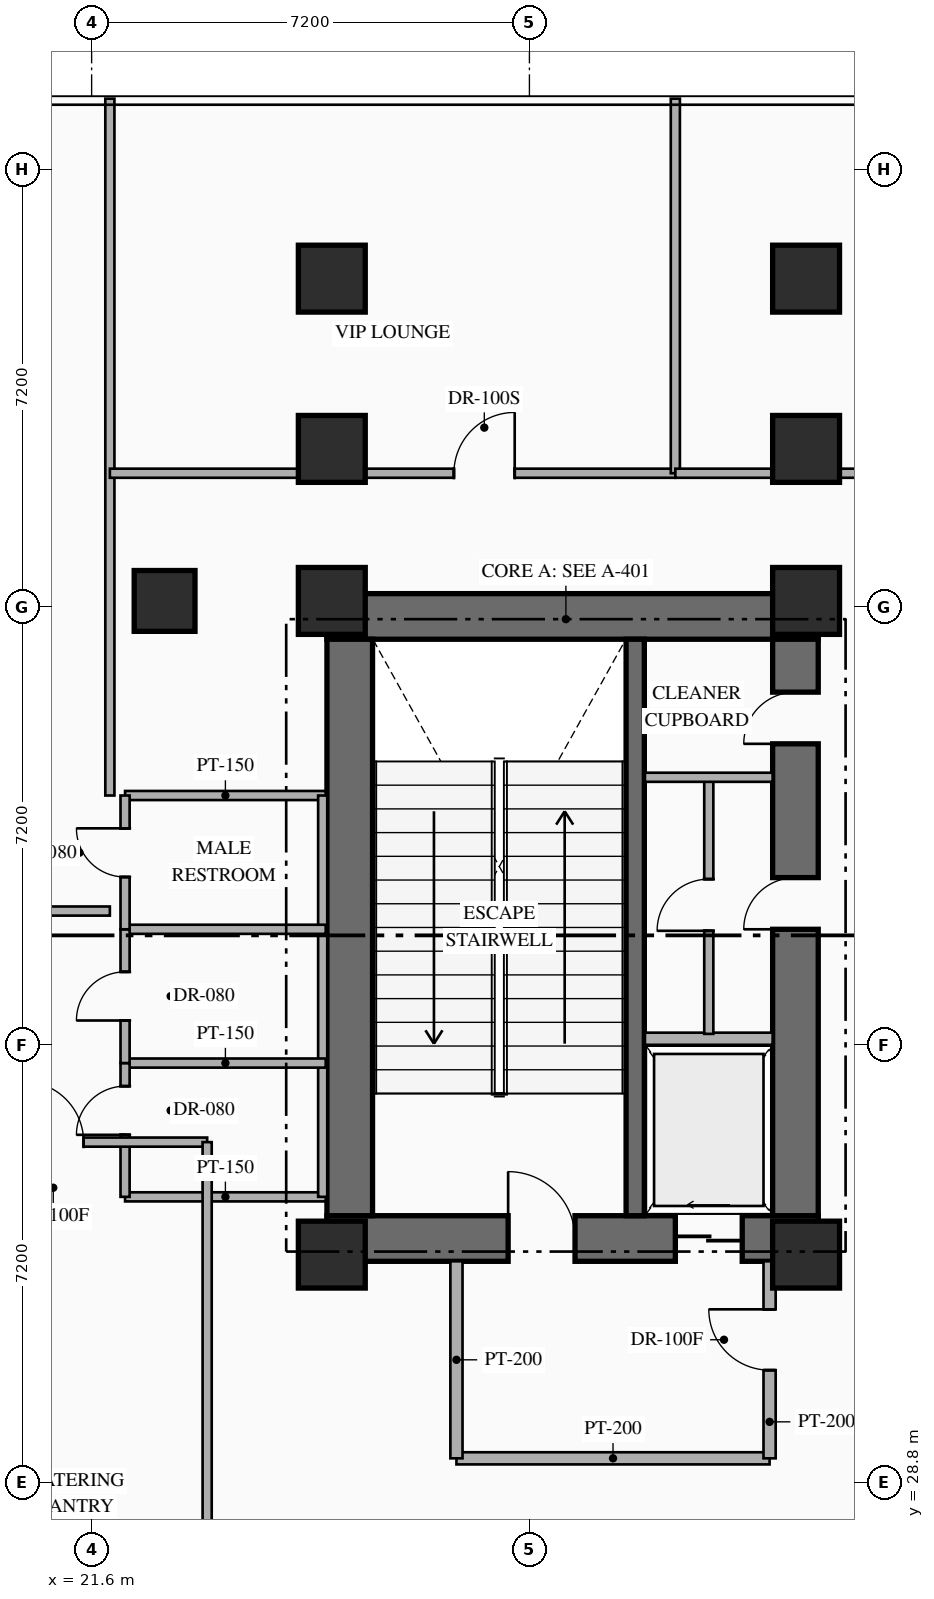
"""IFC4 building model, lengths in metres.
Left out: names, types, materials, properties, quantities, classifications, styles, units other than length and angle.
Written with IfcOpenShell. Run it as: python <this file> out.ifc"""

import sys

from ifc_helpers import new_model, si_unit, direction, frame, frame_2d, origin, origin_2d, place, context, subcontext, project, spatial, rectangle, hollow_rectangle, extrude, element, fill, save


model = new_model("IFC4")
c1 = context("Model", 3, precision=1e-05, world=origin(), true_north=direction((0.0, 1.0)))
c2 = subcontext(c1, "Body", "Model", "MODEL_VIEW")
j1 = project(units=[si_unit("LENGTHUNIT", "METRE"), si_unit("PLANEANGLEUNIT", "RADIAN")], contexts=[c1])
p1 = place(None, origin())
s1 = spatial("IfcSite", under=j1, at=p1, CompositionType="ELEMENT")
p2 = place(p1, origin())
s2 = spatial("IfcBuilding", under=s1, at=p2, CompositionType="ELEMENT")
p3 = place(p2, frame((0.0, 0.0, 16.2)))
s3 = spatial("IfcBuildingStorey", under=s2, at=p3, CompositionType="ELEMENT", Elevation=16.2)
p4 = place(p3, frame((25.47, 32.815, 0.0), z_axis=(0.0, 0.0, 1.0), x_axis=(1.0, 0.0, 0.0)))
e1 = element("IfcWall", 1, at=p4, inside=s3, PredefinedType="SHEAR", context=c2, shape_type="SweptSolid", body=[
    extrude(rectangle(XDim=8.08, YDim=0.75, at=frame_2d((4.04, 0.0))), origin(), (0.0, 0.0, 1.0), 5.4),
])
p5 = place(p4, frame((2.98, 0.0, 0.0)))
e2 = element("IfcOpeningElement", 2, at=p5, cuts=e1, PredefinedType="OPENING", context=c2, shape_type="SweptSolid", body=[
    extrude(rectangle(XDim=1.1, YDim=2.2, at=frame_2d((0.55, 1.1))), frame((0.0, 0.385, 0.0), z_axis=(0.0, -1.0, 0.0), x_axis=(1.0, 0.0, 0.0)), (0.0, 0.0, 1.0), 0.77),
])
p6 = place(p4, frame((5.73, 0.0, 0.0)))
e3 = element("IfcOpeningElement", 3, at=p6, cuts=e1, PredefinedType="OPENING", context=c2, shape_type="SweptSolid", body=[
    extrude(rectangle(XDim=1.1, YDim=2.15, at=frame_2d((0.55, 1.075))), frame((0.0, 0.385, 0.0), z_axis=(0.0, -1.0, 0.0), x_axis=(1.0, 0.0, 0.0)), (0.0, 0.0, 1.0), 0.77),
])
p7 = place(p3, frame((25.47, 43.045, 0.0), z_axis=(0.0, 0.0, 1.0), x_axis=(1.0, 0.0, 0.0)))
e4 = element("IfcWall", 4, at=p7, inside=s3, PredefinedType="SHEAR", context=c2, shape_type="SweptSolid", body=[
    extrude(rectangle(XDim=8.08, YDim=0.75, at=frame_2d((4.04, 0.0))), origin(), (0.0, 0.0, 1.0), 5.4),
])
p8 = place(p3, frame((25.845, 33.19, 0.0), z_axis=(0.0, 0.0, 1.0), x_axis=(0.0, 1.0, 0.0)))
e5 = element("IfcWall", 5, at=p8, inside=s3, PredefinedType="SHEAR", context=c2, shape_type="SweptSolid", body=[
    extrude(rectangle(XDim=9.48, YDim=0.75, at=frame_2d((4.74, 0.0))), origin(), (0.0, 0.0, 1.0), 5.4),
])
p9 = place(p3, frame((33.175, 33.19, 0.0), z_axis=(0.0, 0.0, 1.0), x_axis=(0.0, 1.0, 0.0)))
e6 = element("IfcWall", 6, at=p9, inside=s3, PredefinedType="SHEAR", context=c2, shape_type="SweptSolid", body=[
    extrude(rectangle(XDim=9.48, YDim=0.75, at=frame_2d((4.74, 0.0))), origin(), (0.0, 0.0, 1.0), 5.4),
])
p10 = place(p9, frame((4.71, 0.0, 0.0)))
e7 = element("IfcOpeningElement", 7, at=p10, cuts=e6, PredefinedType="OPENING", context=c2, shape_type="SweptSolid", body=[
    extrude(rectangle(XDim=0.85, YDim=2.08, at=frame_2d((0.425, 1.04))), frame((0.0, 0.385, 0.0), z_axis=(0.0, -1.0, 0.0), x_axis=(1.0, 0.0, 0.0)), (0.0, 0.0, 1.0), 0.77),
])
p11 = place(p9, frame((7.76, 0.0, 0.0)))
e8 = element("IfcOpeningElement", 8, at=p11, cuts=e6, PredefinedType="OPENING", context=c2, shape_type="SweptSolid", body=[
    extrude(rectangle(XDim=0.85, YDim=2.08, at=frame_2d((0.425, 1.04))), frame((0.0, 0.385, 0.0), z_axis=(0.0, -1.0, 0.0), x_axis=(1.0, 0.0, 0.0)), (0.0, 0.0, 1.0), 0.77),
])
p12 = place(p3, frame((30.54, 33.19, 0.0), z_axis=(0.0, 0.0, 1.0), x_axis=(0.0, 1.0, 0.0)))
e9 = element("IfcWall", 9, at=p12, inside=s3, PredefinedType="SHEAR", context=c2, shape_type="SweptSolid", body=[
    extrude(rectangle(XDim=9.48, YDim=0.3, at=frame_2d((4.74, 0.0))), origin(), (0.0, 0.0, 1.0), 5.4),
])
for number, where, z_axis, x_axis in (
    (10, (25.55, 32.55, 0.0), (0.0, 0.0, 1.0), (1.0, 0.0, 0.0)),
    (11, (33.35, 32.55, 0.0), (0.0, 0.0, 1.0), (1.0, 0.0, 0.0)),
    (12, (25.55, 43.3, 0.0), (0.0, 0.0, 1.0), (1.0, 0.0, 0.0)),
    (13, (33.35, 43.3, 0.0), (0.0, 0.0, 1.0), (1.0, 0.0, 0.0)),
):
    element("IfcColumn", number, at=place(p3, frame(where, z_axis=z_axis, x_axis=x_axis)), inside=s3, PredefinedType="COLUMN", context=c2, shape_type="SweptSolid", body=[
        extrude(rectangle(XDim=1.1, YDim=1.1, at=origin_2d()), origin(), (0.0, 0.0, 1.0), 5.4),
    ])
for number, where, z_axis, x_axis in (
    (14, (25.55, 45.8, 0.0), (0.0, 0.0, 1.0), (1.0, 0.0, 0.0)),
    (15, (33.35, 45.8, 0.0), (0.0, 0.0, 1.0), (1.0, 0.0, 0.0)),
    (16, (25.55, 48.6, 0.0), (0.0, 0.0, 1.0), (1.0, 0.0, 0.0)),
    (17, (33.35, 48.6, 0.0), (0.0, 0.0, 1.0), (1.0, 0.0, 0.0)),
):
    element("IfcColumn", number, at=place(p3, frame(where, z_axis=z_axis, x_axis=x_axis)), inside=s3, PredefinedType="COLUMN", context=c2, shape_type="SweptSolid", body=[
        extrude(hollow_rectangle(XDim=1.1, YDim=1.1, WallThickness=0.04, at=origin_2d()), origin(), (0.0, 0.0, 1.0), 5.4),
    ])
p13 = place(p3, frame((22.8, 43.3, 0.0), z_axis=(0.0, 0.0, 1.0), x_axis=(1.0, 0.0, 0.0)))
e18 = element("IfcColumn", 18, at=p13, inside=s3, PredefinedType="COLUMN", context=c2, shape_type="SweptSolid", body=[
    extrude(hollow_rectangle(XDim=1.0, YDim=1.0, WallThickness=0.038, at=origin_2d()), origin(), (0.0, 0.0, 1.0), 5.4),
])
p14 = place(p3, frame((30.7, 36.1, 0.0), z_axis=(0.0, 0.0, 1.0), x_axis=(1.0, 0.0, 0.0)))
e19 = element("IfcWall", 19, at=p14, inside=s3, PredefinedType="STANDARD", context=c2, shape_type="SweptSolid", body=[
    extrude(rectangle(XDim=2.1, YDim=0.2, at=frame_2d((1.05, 0.0))), origin(), (0.0, 0.0, 1.0), 5.1),
])
p15 = place(p3, frame((31.75, 36.18, 0.0), z_axis=(0.0, 0.0, 1.0), x_axis=(0.0, 1.0, 0.0)))
e20 = element("IfcWall", 20, at=p15, inside=s3, PredefinedType="PARTITIONING", context=c2, shape_type="SweptSolid", body=[
    extrude(rectangle(XDim=4.24, YDim=0.15, at=frame_2d((2.12, 0.0))), origin(), (0.0, 0.0, 1.0), 5.1),
])
p16 = place(p15, frame((1.695, 0.0, 0.0)))
e21 = element("IfcOpeningElement", 21, at=p16, cuts=e20, PredefinedType="OPENING", context=c2, shape_type="SweptSolid", body=[
    extrude(rectangle(XDim=0.85, YDim=2.08, at=frame_2d((0.425, 1.04))), frame((0.0, 0.085, 0.0), z_axis=(0.0, -1.0, 0.0), x_axis=(1.0, 0.0, 0.0)), (0.0, 0.0, 1.0), 0.17),
])
p17 = place(p3, frame((30.7, 40.4, 0.0), z_axis=(0.0, 0.0, 1.0), x_axis=(1.0, 0.0, 0.0)))
e22 = element("IfcWall", 22, at=p17, inside=s3, PredefinedType="PARTITIONING", context=c2, shape_type="SweptSolid", body=[
    extrude(rectangle(XDim=2.1, YDim=0.15, at=frame_2d((1.05, 0.0))), origin(), (0.0, 0.0, 1.0), 5.1),
])
p18 = place(p3, frame((27.6, 29.2, 0.0), z_axis=(0.0, 0.0, 1.0), x_axis=(1.0, 0.0, 0.0)))
e23 = element("IfcWall", 23, at=p18, inside=s3, PredefinedType="STANDARD", context=c2, shape_type="SweptSolid", body=[
    extrude(rectangle(XDim=5.15, YDim=0.2, at=frame_2d((2.575, 0.0))), origin(), (0.0, 0.0, 1.0), 5.1),
])
p19 = place(p3, frame((27.6, 29.2, 0.0), z_axis=(0.0, 0.0, 1.0), x_axis=(0.0, 1.0, 0.0)))
e24 = element("IfcWall", 24, at=p19, inside=s3, PredefinedType="STANDARD", context=c2, shape_type="SweptSolid", body=[
    extrude(rectangle(XDim=3.24, YDim=0.2, at=frame_2d((1.62, 0.0))), origin(), (0.0, 0.0, 1.0), 5.1),
])
p20 = place(p3, frame((32.75, 29.2, 0.0), z_axis=(0.0, 0.0, 1.0), x_axis=(0.0, 1.0, 0.0)))
e25 = element("IfcWall", 25, at=p20, inside=s3, PredefinedType="STANDARD", context=c2, shape_type="SweptSolid", body=[
    extrude(rectangle(XDim=3.24, YDim=0.2, at=frame_2d((1.62, 0.0))), origin(), (0.0, 0.0, 1.0), 5.1),
])
p21 = place(p20, frame((1.45, 0.0, 0.0)))
e26 = element("IfcOpeningElement", 26, at=p21, cuts=e25, PredefinedType="OPENING", context=c2, shape_type="SweptSolid", body=[
    extrude(rectangle(XDim=1.0, YDim=2.2, at=frame_2d((0.5, 1.1))), frame((0.0, 0.11, 0.0), z_axis=(0.0, -1.0, 0.0), x_axis=(1.0, 0.0, 0.0)), (0.0, 0.0, 1.0), 0.22),
])
for number, where, z_axis, x_axis in (
    (27, (22.15, 33.5, 0.0), (0.0, 0.0, 1.0), (1.0, 0.0, 0.0)),
    (28, (22.15, 40.1, 0.0), (0.0, 0.0, 1.0), (1.0, 0.0, 0.0)),
):
    element("IfcWall", number, at=place(p3, frame(where, z_axis=z_axis, x_axis=x_axis)), inside=s3, PredefinedType="PARTITIONING", context=c2, shape_type="SweptSolid", body=[
        extrude(rectangle(XDim=3.3, YDim=0.15, at=frame_2d((1.65, 0.0))), origin(), (0.0, 0.0, 1.0), 5.1),
    ])
p22 = place(p3, frame((25.4, 33.5, 0.0), z_axis=(0.0, 0.0, 1.0), x_axis=(0.0, 1.0, 0.0)))
e29 = element("IfcWall", 29, at=p22, inside=s3, PredefinedType="PARTITIONING", context=c2, shape_type="SweptSolid", body=[
    extrude(rectangle(XDim=6.6, YDim=0.15, at=frame_2d((3.3, 0.0))), origin(), (0.0, 0.0, 1.0), 5.1),
])
for number, where, z_axis, x_axis in (
    (30, (22.15, 35.7, 0.0), (0.0, 0.0, 1.0), (1.0, 0.0, 0.0)),
    (31, (22.15, 37.9, 0.0), (0.0, 0.0, 1.0), (1.0, 0.0, 0.0)),
):
    element("IfcWall", number, at=place(p3, frame(where, z_axis=z_axis, x_axis=x_axis)), inside=s3, PredefinedType="PARTITIONING", context=c2, shape_type="SweptSolid", body=[
        extrude(rectangle(XDim=3.3, YDim=0.15, at=frame_2d((1.65, 0.0))), origin(), (0.0, 0.0, 1.0), 5.1),
    ])
p23 = place(p3, frame((22.15, 33.5, 0.0), z_axis=(0.0, 0.0, 1.0), x_axis=(0.0, 1.0, 0.0)))
e32 = element("IfcWall", 32, at=p23, inside=s3, PredefinedType="PARTITIONING", context=c2, shape_type="SweptSolid", body=[
    extrude(rectangle(XDim=2.2, YDim=0.15, at=frame_2d((1.1, 0.0))), origin(), (0.0, 0.0, 1.0), 5.1),
])
p24 = place(p23, frame((1.02, 0.0, 0.0)))
e33 = element("IfcOpeningElement", 33, at=p24, cuts=e32, PredefinedType="OPENING", context=c2, shape_type="SweptSolid", body=[
    extrude(rectangle(XDim=0.8, YDim=2.06, at=frame_2d((0.4, 1.03))), frame((0.0, 0.085, 0.0), z_axis=(0.0, -1.0, 0.0), x_axis=(1.0, 0.0, 0.0)), (0.0, 0.0, 1.0), 0.17),
])
p25 = place(p3, frame((22.15, 35.7, 0.0), z_axis=(0.0, 0.0, 1.0), x_axis=(0.0, 1.0, 0.0)))
e34 = element("IfcWall", 34, at=p25, inside=s3, PredefinedType="PARTITIONING", context=c2, shape_type="SweptSolid", body=[
    extrude(rectangle(XDim=2.2, YDim=0.15, at=frame_2d((1.1, 0.0))), origin(), (0.0, 0.0, 1.0), 5.1),
])
p26 = place(p25, frame((0.7, 0.0, 0.0)))
e35 = element("IfcOpeningElement", 35, at=p26, cuts=e34, PredefinedType="OPENING", context=c2, shape_type="SweptSolid", body=[
    extrude(rectangle(XDim=0.8, YDim=2.06, at=frame_2d((0.4, 1.03))), frame((0.0, 0.085, 0.0), z_axis=(0.0, -1.0, 0.0), x_axis=(1.0, 0.0, 0.0)), (0.0, 0.0, 1.0), 0.17),
])
p27 = place(p3, frame((22.15, 37.9, 0.0), z_axis=(0.0, 0.0, 1.0), x_axis=(0.0, 1.0, 0.0)))
e36 = element("IfcWall", 36, at=p27, inside=s3, PredefinedType="PARTITIONING", context=c2, shape_type="SweptSolid", body=[
    extrude(rectangle(XDim=2.2, YDim=0.15, at=frame_2d((1.1, 0.0))), origin(), (0.0, 0.0, 1.0), 5.1),
])
p28 = place(p27, frame((0.86, 0.0, 0.0)))
e37 = element("IfcOpeningElement", 37, at=p28, cuts=e36, PredefinedType="OPENING", context=c2, shape_type="SweptSolid", body=[
    extrude(rectangle(XDim=0.8, YDim=2.06, at=frame_2d((0.4, 1.03))), frame((0.0, 0.085, 0.0), z_axis=(0.0, -1.0, 0.0), x_axis=(1.0, 0.0, 0.0)), (0.0, 0.0, 1.0), 0.17),
])
p29 = place(p3, frame((14.2, 38.2, 0.0), z_axis=(0.0, 0.0, 1.0), x_axis=(1.0, 0.0, 0.0)))
e38 = element("IfcWall", 38, at=p29, inside=s3, PredefinedType="PARTITIONING", context=c2, shape_type="SweptSolid", body=[
    extrude(rectangle(XDim=7.7, YDim=0.15, at=frame_2d((3.85, 0.0))), origin(), (0.0, 0.0, 1.0), 5.1),
])
p30 = place(p29, frame((3.375, 0.0, 0.0)))
e39 = element("IfcOpeningElement", 39, at=p30, cuts=e38, PredefinedType="OPENING", context=c2, shape_type="SweptSolid", body=[
    extrude(rectangle(XDim=0.95, YDim=2.15, at=frame_2d((0.475, 1.075))), frame((0.0, 0.085, 0.0), z_axis=(0.0, -1.0, 0.0), x_axis=(1.0, 0.0, 0.0)), (0.0, 0.0, 1.0), 0.17),
])
p31 = place(p3, frame((21.9, 40.1, 0.0), z_axis=(0.0, 0.0, 1.0), x_axis=(0.0, 1.0, 0.0)))
e40 = element("IfcWall", 40, at=p31, inside=s3, PredefinedType="PARTITIONING", context=c2, shape_type="SweptSolid", body=[
    extrude(rectangle(XDim=11.46, YDim=0.15, at=frame_2d((5.73, 0.0))), origin(), (0.0, 0.0, 1.0), 5.1),
])
p32 = place(p3, frame((19.2, 34.4, 0.0), z_axis=(0.0, 0.0, 1.0), x_axis=(1.0, 0.0, 0.0)))
e41 = element("IfcWall", 41, at=p32, inside=s3, PredefinedType="PARTITIONING", context=c2, shape_type="SweptSolid", body=[
    extrude(rectangle(XDim=4.3, YDim=0.15, at=frame_2d((2.15, 0.0))), origin(), (0.0, 0.0, 1.0), 5.1),
])
p33 = place(p32, frame((1.269, 0.0, 0.0)))
e42 = element("IfcOpeningElement", 42, at=p33, cuts=e41, PredefinedType="OPENING", context=c2, shape_type="SweptSolid", body=[
    extrude(rectangle(XDim=1.0, YDim=2.2, at=frame_2d((0.5, 1.1))), frame((0.0, 0.085, 0.0), z_axis=(0.0, -1.0, 0.0), x_axis=(1.0, 0.0, 0.0)), (0.0, 0.0, 1.0), 0.17),
])
p34 = place(p3, frame((23.5, 23.44, 0.0), z_axis=(0.0, 0.0, 1.0), x_axis=(0.0, 1.0, 0.0)))
e43 = element("IfcWall", 43, at=p34, inside=s3, PredefinedType="PARTITIONING", context=c2, shape_type="SweptSolid", body=[
    extrude(rectangle(XDim=10.96, YDim=0.15, at=frame_2d((5.48, 0.0))), origin(), (0.0, 0.0, 1.0), 5.1),
])
p35 = place(p3, frame((21.9, 45.4, 0.0), z_axis=(0.0, 0.0, 1.0), x_axis=(1.0, 0.0, 0.0)))
e44 = element("IfcWall", 44, at=p35, inside=s3, PredefinedType="PARTITIONING", context=c2, shape_type="SweptSolid", body=[
    extrude(rectangle(XDim=9.3, YDim=0.15, at=frame_2d((4.65, 0.0))), origin(), (0.0, 0.0, 1.0), 5.1),
])
p36 = place(p35, frame((5.658, 0.0, 0.0)))
e45 = element("IfcOpeningElement", 45, at=p36, cuts=e44, PredefinedType="OPENING", context=c2, shape_type="SweptSolid", body=[
    extrude(rectangle(XDim=1.0, YDim=2.15, at=frame_2d((0.5, 1.075))), frame((0.0, 0.085, 0.0), z_axis=(0.0, -1.0, 0.0), x_axis=(1.0, 0.0, 0.0)), (0.0, 0.0, 1.0), 0.17),
])
p37 = place(p3, frame((31.2, 45.4, 0.0), z_axis=(0.0, 0.0, 1.0), x_axis=(0.0, 1.0, 0.0)))
e46 = element("IfcWall", 46, at=p37, inside=s3, PredefinedType="PARTITIONING", context=c2, shape_type="SweptSolid", body=[
    extrude(rectangle(XDim=6.16, YDim=0.15, at=frame_2d((3.08, 0.0))), origin(), (0.0, 0.0, 1.0), 5.1),
])
p38 = place(p3, frame((31.2, 45.4, 0.0), z_axis=(0.0, 0.0, 1.0), x_axis=(1.0, 0.0, 0.0)))
e47 = element("IfcWall", 47, at=p38, inside=s3, PredefinedType="PARTITIONING", context=c2, shape_type="SweptSolid", body=[
    extrude(rectangle(XDim=13.76, YDim=0.15, at=frame_2d((6.88, 0.0))), origin(), (0.0, 0.0, 1.0), 5.1),
])
p39 = place(p38, frame((6.33, 0.0, 0.0)))
e48 = element("IfcOpeningElement", 48, at=p39, cuts=e47, PredefinedType="OPENING", context=c2, shape_type="SweptSolid", body=[
    extrude(rectangle(XDim=1.1, YDim=2.24, at=frame_2d((0.55, 1.12))), frame((0.0, 0.085, 0.0), z_axis=(0.0, -1.0, 0.0), x_axis=(1.0, 0.0, 0.0)), (0.0, 0.0, 1.0), 0.17),
])
p40 = place(p5, origin())
e49 = element("IfcDoor", 49, at=p40, inside=s3, OperationType="SINGLE_SWING_LEFT", PredefinedType="DOOR", context=c2, shape_type="SweptSolid", body=[
    extrude(rectangle(XDim=1.1, YDim=2.2, at=frame_2d((0.55, 1.1))), frame((0.0, 0.025, 0.0), z_axis=(0.0, -1.0, 0.0), x_axis=(1.0, 0.0, 0.0)), (0.0, 0.0, 1.0), 0.05),
])
fill(e2, e49)
p41 = place(p6, origin())
e50 = element("IfcDoor", 50, at=p41, inside=s3, OperationType="SLIDING_TO_LEFT", PredefinedType="USERDEFINED", context=c2, shape_type="SweptSolid", body=[
    extrude(rectangle(XDim=1.1, YDim=2.15, at=frame_2d((0.55, 1.075))), frame((0.0, 0.025, 0.0), z_axis=(0.0, -1.0, 0.0), x_axis=(1.0, 0.0, 0.0)), (0.0, 0.0, 1.0), 0.05),
])
fill(e3, e50)
p42 = place(p10, origin())
e51 = element("IfcDoor", 51, at=p42, inside=s3, OperationType="SINGLE_SWING_LEFT", PredefinedType="DOOR", context=c2, shape_type="SweptSolid", body=[
    extrude(rectangle(XDim=0.85, YDim=2.08, at=frame_2d((0.425, 1.04))), frame((0.0, 0.025, 0.0), z_axis=(0.0, -1.0, 0.0), x_axis=(1.0, 0.0, 0.0)), (0.0, 0.0, 1.0), 0.05),
])
fill(e7, e51)
p43 = place(p11, origin())
e52 = element("IfcDoor", 52, at=p43, inside=s3, OperationType="SINGLE_SWING_LEFT", PredefinedType="DOOR", context=c2, shape_type="SweptSolid", body=[
    extrude(rectangle(XDim=0.85, YDim=2.08, at=frame_2d((0.425, 1.04))), frame((0.0, 0.025, 0.0), z_axis=(0.0, -1.0, 0.0), x_axis=(1.0, 0.0, 0.0)), (0.0, 0.0, 1.0), 0.05),
])
fill(e8, e52)
p44 = place(p16, origin())
e53 = element("IfcDoor", 53, at=p44, inside=s3, OperationType="SINGLE_SWING_LEFT", PredefinedType="DOOR", context=c2, shape_type="SweptSolid", body=[
    extrude(rectangle(XDim=0.85, YDim=2.08, at=frame_2d((0.425, 1.04))), frame((0.0, 0.025, 0.0), z_axis=(0.0, -1.0, 0.0), x_axis=(1.0, 0.0, 0.0)), (0.0, 0.0, 1.0), 0.05),
])
fill(e21, e53)
p45 = place(p21, origin())
e54 = element("IfcDoor", 54, at=p45, inside=s3, OperationType="SINGLE_SWING_RIGHT", PredefinedType="DOOR", context=c2, shape_type="SweptSolid", body=[
    extrude(rectangle(XDim=1.0, YDim=2.2, at=frame_2d((0.5, 1.1))), frame((0.0, 0.025, 0.0), z_axis=(0.0, -1.0, 0.0), x_axis=(1.0, 0.0, 0.0)), (0.0, 0.0, 1.0), 0.05),
])
fill(e26, e54)
p46 = place(p24, origin())
e55 = element("IfcDoor", 55, at=p46, inside=s3, OperationType="SINGLE_SWING_LEFT", PredefinedType="DOOR", context=c2, shape_type="SweptSolid", body=[
    extrude(rectangle(XDim=0.8, YDim=2.06, at=frame_2d((0.4, 1.03))), frame((0.0, 0.025, 0.0), z_axis=(0.0, -1.0, 0.0), x_axis=(1.0, 0.0, 0.0)), (0.0, 0.0, 1.0), 0.05),
])
fill(e33, e55)
p47 = place(p26, origin())
e56 = element("IfcDoor", 56, at=p47, inside=s3, OperationType="SINGLE_SWING_LEFT", PredefinedType="DOOR", context=c2, shape_type="SweptSolid", body=[
    extrude(rectangle(XDim=0.8, YDim=2.06, at=frame_2d((0.4, 1.03))), frame((0.0, 0.025, 0.0), z_axis=(0.0, -1.0, 0.0), x_axis=(1.0, 0.0, 0.0)), (0.0, 0.0, 1.0), 0.05),
])
fill(e35, e56)
p48 = place(p28, origin())
e57 = element("IfcDoor", 57, at=p48, inside=s3, OperationType="SINGLE_SWING_RIGHT", PredefinedType="DOOR", context=c2, shape_type="SweptSolid", body=[
    extrude(rectangle(XDim=0.8, YDim=2.06, at=frame_2d((0.4, 1.03))), frame((0.0, 0.025, 0.0), z_axis=(0.0, -1.0, 0.0), x_axis=(1.0, 0.0, 0.0)), (0.0, 0.0, 1.0), 0.05),
])
fill(e37, e57)
p49 = place(p33, origin())
e58 = element("IfcDoor", 58, at=p49, inside=s3, OperationType="SINGLE_SWING_LEFT", PredefinedType="DOOR", context=c2, shape_type="SweptSolid", body=[
    extrude(rectangle(XDim=1.0, YDim=2.2, at=frame_2d((0.5, 1.1))), frame((0.0, 0.025, 0.0), z_axis=(0.0, -1.0, 0.0), x_axis=(1.0, 0.0, 0.0)), (0.0, 0.0, 1.0), 0.05),
])
fill(e42, e58)
p50 = place(p36, origin())
e59 = element("IfcDoor", 59, at=p50, inside=s3, OperationType="SINGLE_SWING_RIGHT", PredefinedType="DOOR", context=c2, shape_type="SweptSolid", body=[
    extrude(rectangle(XDim=1.0, YDim=2.15, at=frame_2d((0.5, 1.075))), frame((0.0, 0.025, 0.0), z_axis=(0.0, -1.0, 0.0), x_axis=(1.0, 0.0, 0.0)), (0.0, 0.0, 1.0), 0.05),
])
fill(e45, e59)
save(model, sys.argv[1])
